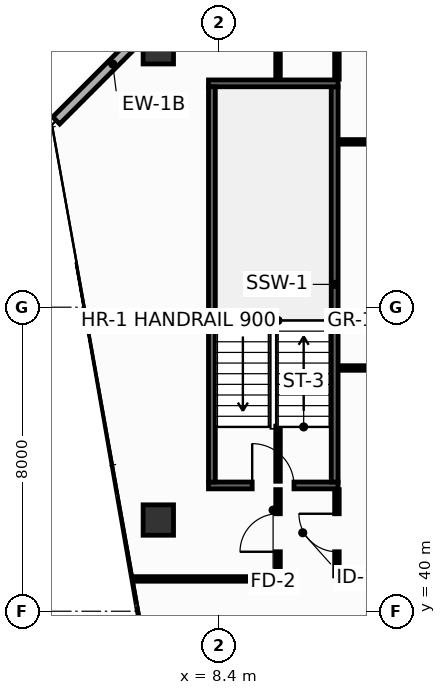
"""IFC4 building model, lengths in metres.
Left out: names, types, materials, properties, quantities, classifications, styles, units other than length and angle.
Written with IfcOpenShell. Run it as: python <this file> out.ifc"""

import sys

from ifc_helpers import new_model, si_unit, direction, frame, frame_2d, origin, origin_2d, place, context, subcontext, project, spatial, rectangle, hollow_rectangle, extrude, element, fill, save


model = new_model("IFC4")
c1 = context("Model", 3, precision=1e-05, world=origin(), true_north=direction((0.0, 1.0)))
c2 = subcontext(c1, "Body", "Model", "MODEL_VIEW")
j1 = project(units=[si_unit("LENGTHUNIT", "METRE"), si_unit("PLANEANGLEUNIT", "RADIAN")], contexts=[c1])
p1 = place(None, origin())
s1 = spatial("IfcSite", under=j1, at=p1, CompositionType="ELEMENT")
p2 = place(p1, origin())
s2 = spatial("IfcBuilding", under=s1, at=p2, CompositionType="ELEMENT")
p3 = place(p2, frame((0.0, 0.0, 253.4)))
s3 = spatial("IfcBuildingStorey", under=s2, at=p3, CompositionType="ELEMENT", Elevation=253.4)
for number, where, z_axis, x_axis in (
    (1, (6.8, 54.8, 0.0), (0.0, 0.0, 1.0), (1.0, 0.0, 0.0)),
    (2, (6.8, 42.4, 0.0), (0.0, 0.0, 1.0), (1.0, 0.0, 0.0)),
):
    element("IfcColumn", number, at=place(p3, frame(where, z_axis=z_axis, x_axis=x_axis)), inside=s3, PredefinedType="COLUMN", context=c2, shape_type="SweptSolid", body=[
        extrude(hollow_rectangle(XDim=0.8, YDim=0.8, WallThickness=0.036, at=origin_2d()), origin(), (0.0, 0.0, 1.0), 3.8),
    ])
p4 = place(p3, frame((8.12, 43.31, 0.0), z_axis=(0.0, 0.0, 1.0), x_axis=(1.0, 0.0, 0.0)))
e3 = element("IfcWall", 3, at=p4, inside=s3, PredefinedType="SHEAR", context=c2, shape_type="SweptSolid", body=[
    extrude(rectangle(XDim=3.41, YDim=0.18, at=frame_2d((1.705, 0.0))), origin(), (0.0, 0.0, 1.0), 3.55),
])
p5 = place(p4, frame((1.15, 0.0, 0.0)))
e4 = element("IfcOpeningElement", 4, at=p5, cuts=e3, PredefinedType="OPENING", context=c2, shape_type="SweptSolid", body=[
    extrude(rectangle(XDim=1.1, YDim=2.15, at=frame_2d((0.55, 1.075))), frame((0.0, 0.1, 0.0), z_axis=(0.0, -1.0, 0.0), x_axis=(1.0, 0.0, 0.0)), (0.0, 0.0, 1.0), 0.2),
])
p6 = place(p3, frame((11.44, 43.4, 0.0), z_axis=(0.0, 0.0, 1.0), x_axis=(0.0, 1.0, 0.0)))
e5 = element("IfcWall", 5, at=p6, inside=s3, PredefinedType="SHEAR", context=c2, shape_type="SweptSolid", body=[
    extrude(rectangle(XDim=10.4, YDim=0.18, at=frame_2d((5.2, 0.0))), origin(), (0.0, 0.0, 1.0), 3.55),
])
p7 = place(p3, frame((11.53, 53.89, 0.0), z_axis=(0.0, 0.0, 1.0), x_axis=(-1.0, 0.0, 0.0)))
e6 = element("IfcWall", 6, at=p7, inside=s3, PredefinedType="SHEAR", context=c2, shape_type="SweptSolid", body=[
    extrude(rectangle(XDim=3.41, YDim=0.18, at=frame_2d((1.705, 0.0))), origin(), (0.0, 0.0, 1.0), 3.55),
])
p8 = place(p3, frame((8.21, 53.8, 0.0), z_axis=(0.0, 0.0, 1.0), x_axis=(0.0, -1.0, 0.0)))
e7 = element("IfcWall", 7, at=p8, inside=s3, PredefinedType="SHEAR", context=c2, shape_type="SweptSolid", body=[
    extrude(rectangle(XDim=10.4, YDim=0.18, at=frame_2d((5.2, 0.0))), origin(), (0.0, 0.0, 1.0), 3.55),
])
p9 = place(p3, frame((7.087, 55.887, 0.0), z_axis=(0.0, 0.0, 1.0), x_axis=(-0.707106781187, -0.707106781187, 0.0)))
e8 = element("IfcWall", 8, at=p9, inside=s3, PredefinedType="STANDARD", context=c2, shape_type="SweptSolid", body=[
    extrude(rectangle(XDim=4.206, YDim=0.26, at=frame_2d((2.103, 0.0))), origin(), (0.0, 0.0, 1.0), 3.55),
])
p10 = place(p3, frame((6.143, 40.85, 0.0), z_axis=(0.0, 0.0, 1.0), x_axis=(1.0, 0.0, 0.0)))
e9 = element("IfcWall", 9, at=p10, inside=s3, PredefinedType="PARTITIONING", context=c2, shape_type="SweptSolid", body=[
    extrude(rectangle(XDim=3.807, YDim=0.12, at=frame_2d((1.903, 0.0))), origin(), (0.0, 0.0, 1.0), 3.085),
])
p11 = place(p3, frame((11.5, 40.85, 0.0), z_axis=(0.0, 0.0, 1.0), x_axis=(1.0, 0.0, 0.0)))
e10 = element("IfcWall", 10, at=p11, inside=s3, PredefinedType="PARTITIONING", context=c2, shape_type="SweptSolid", body=[
    extrude(rectangle(XDim=2.35, YDim=0.12, at=frame_2d((1.175, 0.0))), origin(), (0.0, 0.0, 1.0), 3.55),
])
p12 = place(p3, frame((11.55, 52.35, 0.0), z_axis=(0.0, 0.0, 1.0), x_axis=(1.0, 0.0, 0.0)))
e11 = element("IfcWall", 11, at=p12, inside=s3, PredefinedType="PARTITIONING", context=c2, shape_type="SweptSolid", body=[
    extrude(rectangle(XDim=2.13, YDim=0.12, at=frame_2d((1.065, 0.0))), origin(), (0.0, 0.0, 1.0), 3.55),
])
p13 = place(p3, frame((11.5, 54.0, 0.0), z_axis=(0.0, 0.0, 1.0), x_axis=(0.0, 1.0, 0.0)))
e12 = element("IfcWall", 12, at=p13, inside=s3, PredefinedType="PARTITIONING", context=c2, shape_type="SweptSolid", body=[
    extrude(rectangle(XDim=1.995, YDim=0.12, at=frame_2d((0.998, 0.0))), origin(), (0.0, 0.0, 1.0), 2.935),
])
p14 = place(p3, frame((4.936, 47.6, 0.0), z_axis=(0.0, 0.0, 1.0), x_axis=(1.0, 0.0, 0.0)))
e13 = element("IfcWall", 13, at=p14, inside=s3, PredefinedType="PARTITIONING", context=c2, shape_type="SweptSolid", body=[
    extrude(rectangle(XDim=3.165, YDim=0.12, at=frame_2d((1.582, 0.0))), origin(), (0.0, 0.0, 1.0), 2.947),
])
p15 = place(p3, frame((9.95, 40.93, 0.0), z_axis=(0.0, 0.0, 1.0), x_axis=(0.0, 1.0, 0.0)))
e14 = element("IfcWall", 14, at=p15, inside=s3, PredefinedType="PARTITIONING", context=c2, shape_type="SweptSolid", body=[
    extrude(rectangle(XDim=2.27, YDim=0.12, at=frame_2d((1.135, 0.0))), origin(), (0.0, 0.0, 1.0), 2.947),
])
p16 = place(p15, frame((0.635, 0.0, 0.0)))
e15 = element("IfcOpeningElement", 15, at=p16, cuts=e14, PredefinedType="OPENING", context=c2, shape_type="SweptSolid", body=[
    extrude(rectangle(XDim=1.0, YDim=2.15, at=frame_2d((0.5, 1.075))), frame((0.0, 0.07, 0.0), z_axis=(0.0, -1.0, 0.0), x_axis=(1.0, 0.0, 0.0)), (0.0, 0.0, 1.0), 0.14),
])
p17 = place(p3, frame((9.95, 43.42, 0.0), z_axis=(0.0, 0.0, 1.0), x_axis=(0.0, 1.0, 0.0)))
e16 = element("IfcWall", 16, at=p17, inside=s3, PredefinedType="PARTITIONING", context=c2, shape_type="SweptSolid", body=[
    extrude(rectangle(XDim=1.45, YDim=0.12, at=frame_2d((0.725, 0.0))), origin(), (0.0, 0.0, 1.0), 3.55),
])
p18 = place(p3, frame((9.95, 54.0, 0.0), z_axis=(0.0, 0.0, 1.0), x_axis=(0.0, 1.0, 0.0)))
e17 = element("IfcWall", 17, at=p18, inside=s3, PredefinedType="PARTITIONING", context=c2, shape_type="SweptSolid", body=[
    extrude(rectangle(XDim=1.995, YDim=0.12, at=frame_2d((0.998, 0.0))), origin(), (0.0, 0.0, 1.0), 2.935),
])
p19 = place(p3, frame((11.55, 46.4, 0.0), z_axis=(0.0, 0.0, 1.0), x_axis=(1.0, 0.0, 0.0)))
e18 = element("IfcWall", 18, at=p19, inside=s3, PredefinedType="PARTITIONING", context=c2, shape_type="SweptSolid", body=[
    extrude(rectangle(XDim=2.13, YDim=0.12, at=frame_2d((1.065, 0.0))), origin(), (0.0, 0.0, 1.0), 3.55),
])
p20 = place(p3, frame((11.5, 40.93, 0.0), z_axis=(0.0, 0.0, 1.0), x_axis=(0.0, 1.0, 0.0)))
e19 = element("IfcWall", 19, at=p20, inside=s3, PredefinedType="PARTITIONING", context=c2, shape_type="SweptSolid", body=[
    extrude(rectangle(XDim=2.27, YDim=0.12, at=frame_2d((1.135, 0.0))), origin(), (0.0, 0.0, 1.0), 2.947),
])
p21 = place(p20, frame((0.635, 0.0, 0.0)))
e20 = element("IfcOpeningElement", 20, at=p21, cuts=e19, PredefinedType="OPENING", context=c2, shape_type="SweptSolid", body=[
    extrude(rectangle(XDim=1.0, YDim=2.15, at=frame_2d((0.5, 1.075))), frame((0.0, 0.07, 0.0), z_axis=(0.0, -1.0, 0.0), x_axis=(1.0, 0.0, 0.0)), (0.0, 0.0, 1.0), 0.14),
])
p22 = place(p5, origin())
e21 = element("IfcDoor", 21, at=p22, inside=s3, OperationType="SINGLE_SWING_LEFT", PredefinedType="DOOR", context=c2, shape_type="SweptSolid", body=[
    extrude(rectangle(XDim=1.1, YDim=2.15, at=frame_2d((0.55, 1.075))), frame((0.0, 0.025, 0.0), z_axis=(0.0, -1.0, 0.0), x_axis=(1.0, 0.0, 0.0)), (0.0, 0.0, 1.0), 0.05),
])
fill(e4, e21)
p23 = place(p16, origin())
e22 = element("IfcDoor", 22, at=p23, inside=s3, OperationType="SINGLE_SWING_LEFT", PredefinedType="DOOR", context=c2, shape_type="SweptSolid", body=[
    extrude(rectangle(XDim=1.0, YDim=2.15, at=frame_2d((0.5, 1.075))), frame((0.0, 0.025, 0.0), z_axis=(0.0, -1.0, 0.0), x_axis=(1.0, 0.0, 0.0)), (0.0, 0.0, 1.0), 0.05),
])
fill(e15, e22)
p24 = place(p21, origin())
e23 = element("IfcDoor", 23, at=p24, inside=s3, OperationType="SINGLE_SWING_RIGHT", PredefinedType="DOOR", context=c2, shape_type="SweptSolid", body=[
    extrude(rectangle(XDim=1.0, YDim=2.15, at=frame_2d((0.5, 1.075))), frame((0.0, 0.025, 0.0), z_axis=(0.0, -1.0, 0.0), x_axis=(1.0, 0.0, 0.0)), (0.0, 0.0, 1.0), 0.05),
])
fill(e20, e23)
save(model, sys.argv[1])
